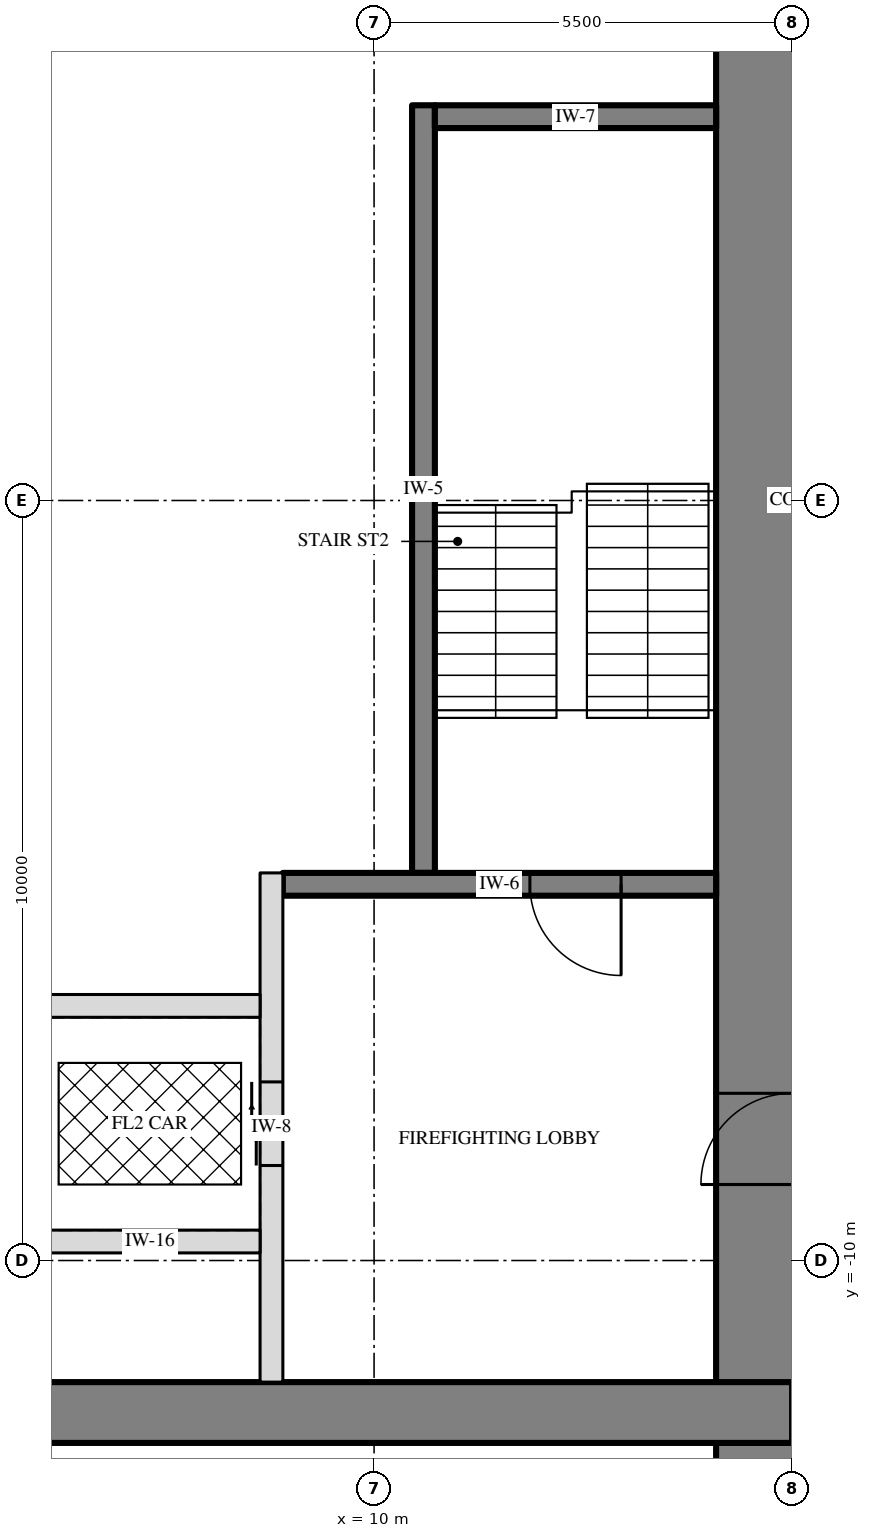
"""IFC4 building model, lengths in metres.
Left out: names, types, materials, properties, quantities, classifications, styles, units other than length and angle.
Written with IfcOpenShell. Run it as: python <this file> out.ifc"""

import sys

from ifc_helpers import new_model, si_unit, direction, frame, frame_2d, origin, place, context, subcontext, project, spatial, rectangle, extrude, element, fill, save


model = new_model("IFC4")
c1 = context("Model", 3, precision=1e-05, world=origin(), true_north=direction((0.0, 1.0)))
c2 = subcontext(c1, "Body", "Model", "MODEL_VIEW")
j1 = project(units=[si_unit("LENGTHUNIT", "METRE"), si_unit("PLANEANGLEUNIT", "RADIAN")], contexts=[c1])
p1 = place(None, origin())
s1 = spatial("IfcSite", under=j1, at=p1, CompositionType="ELEMENT")
p2 = place(p1, origin())
s2 = spatial("IfcBuilding", under=s1, at=p2, CompositionType="ELEMENT")
p3 = place(p2, frame((0.0, 0.0, 107.25)))
s3 = spatial("IfcBuildingStorey", under=s2, at=p3, CompositionType="ELEMENT", Elevation=107.25)
p4 = place(p3, frame((15.5, -15.5, -0.25), z_axis=(0.0, 0.0, 1.0), x_axis=(0.0, 1.0, 0.0)))
e1 = element("IfcWall", 1, at=p4, inside=s3, PredefinedType="SHEAR", context=c2, shape_type="SweptSolid", body=[
    extrude(rectangle(XDim=31.0, YDim=2.0, at=frame_2d((15.5, 0.0))), origin(), (0.0, 0.0, 1.0), 3.75),
])
p5 = place(p4, frame((6.5, 0.0, 0.25)))
e2 = element("IfcOpeningElement", 2, at=p5, cuts=e1, PredefinedType="OPENING", context=c2, shape_type="SweptSolid", body=[
    extrude(rectangle(XDim=1.2, YDim=2.1, at=frame_2d((0.6, 1.05))), frame((0.0, 1.01, 0.0), z_axis=(0.0, -1.0, 0.0), x_axis=(1.0, 0.0, 0.0)), (0.0, 0.0, 1.0), 2.02),
])
p6 = place(p4, frame((23.0, 0.0, 0.25)))
e3 = element("IfcOpeningElement", 3, at=p6, cuts=e1, PredefinedType="OPENING", context=c2, shape_type="SweptSolid", body=[
    extrude(rectangle(XDim=1.8, YDim=2.1, at=frame_2d((0.9, 1.05))), frame((0.0, 1.01, 0.0), z_axis=(0.0, -1.0, 0.0), x_axis=(1.0, 0.0, 0.0)), (0.0, 0.0, 1.0), 2.02),
])
p7 = place(p3, frame((-15.5, -12.0, -0.25), z_axis=(0.0, 0.0, 1.0), x_axis=(1.0, 0.0, 0.0)))
e4 = element("IfcWall", 4, at=p7, inside=s3, PredefinedType="SHEAR", context=c2, shape_type="SweptSolid", body=[
    extrude(rectangle(XDim=31.0, YDim=0.8, at=frame_2d((15.5, 0.0))), origin(), (0.0, 0.0, 1.0), 3.75),
])
p8 = place(p3, frame((10.65, -4.9, 0.0), z_axis=(0.0, 0.0, 1.0), x_axis=(0.0, 1.0, 0.0)))
e5 = element("IfcWall", 5, at=p8, inside=s3, PredefinedType="SOLIDWALL", context=c2, shape_type="SweptSolid", body=[
    extrude(rectangle(XDim=10.1, YDim=0.3, at=frame_2d((5.05, 0.0))), origin(), (0.0, 0.0, 1.0), 3.5),
])
p9 = place(p3, frame((14.5, -5.05, 0.0), z_axis=(0.0, 0.0, 1.0), x_axis=(-1.0, 0.0, 0.0)))
e6 = element("IfcWall", 6, at=p9, inside=s3, PredefinedType="SOLIDWALL", context=c2, shape_type="SweptSolid", body=[
    extrude(rectangle(XDim=5.7, YDim=0.3, at=frame_2d((2.85, 0.0))), origin(), (0.0, 0.0, 1.0), 3.5),
])
p10 = place(p9, frame((1.25, 0.0, 0.0)))
e7 = element("IfcOpeningElement", 7, at=p10, cuts=e6, PredefinedType="OPENING", context=c2, shape_type="SweptSolid", body=[
    extrude(rectangle(XDim=1.2, YDim=2.1, at=frame_2d((0.6, 1.05))), frame((0.0, 0.16, 0.0), z_axis=(0.0, -1.0, 0.0), x_axis=(1.0, 0.0, 0.0)), (0.0, 0.0, 1.0), 0.32),
])
p11 = place(p3, frame((14.5, 5.05, 0.0), z_axis=(0.0, 0.0, 1.0), x_axis=(-1.0, 0.0, 0.0)))
e8 = element("IfcWall", 8, at=p11, inside=s3, PredefinedType="SOLIDWALL", context=c2, shape_type="SweptSolid", body=[
    extrude(rectangle(XDim=3.7, YDim=0.3, at=frame_2d((1.85, 0.0))), origin(), (0.0, 0.0, 1.0), 3.5),
])
p12 = place(p3, frame((8.65, -11.6, 0.0), z_axis=(0.0, 0.0, 1.0), x_axis=(0.0, 1.0, 0.0)))
e9 = element("IfcWall", 9, at=p12, inside=s3, PredefinedType="PARTITIONING", context=c2, shape_type="SweptSolid", body=[
    extrude(rectangle(XDim=6.7, YDim=0.3, at=frame_2d((3.35, 0.0))), origin(), (0.0, 0.0, 1.0), 3.5),
])
p13 = place(p12, frame((2.85, 0.0, 0.0)))
e10 = element("IfcOpeningElement", 10, at=p13, cuts=e9, PredefinedType="OPENING", context=c2, shape_type="SweptSolid", body=[
    extrude(rectangle(XDim=1.1, YDim=2.1, at=frame_2d((0.55, 1.05))), frame((0.0, 0.16, 0.0), z_axis=(0.0, -1.0, 0.0), x_axis=(1.0, 0.0, 0.0)), (0.0, 0.0, 1.0), 0.32),
])
p14 = place(p3, frame((-8.5, -6.65, 0.0), z_axis=(0.0, 0.0, 1.0), x_axis=(1.0, 0.0, 0.0)))
e11 = element("IfcWall", 11, at=p14, inside=s3, PredefinedType="PARTITIONING", context=c2, shape_type="SweptSolid", body=[
    extrude(rectangle(XDim=17.0, YDim=0.3, at=frame_2d((8.5, 0.0))), origin(), (0.0, 0.0, 1.0), 3.5),
])
p15 = place(p14, frame((7.8, 0.0, 0.0)))
e12 = element("IfcOpeningElement", 12, at=p15, cuts=e11, PredefinedType="OPENING", context=c2, shape_type="SweptSolid", body=[
    extrude(rectangle(XDim=1.3, YDim=2.4, at=frame_2d((0.65, 1.2))), frame((0.0, 0.16, 0.0), z_axis=(0.0, -1.0, 0.0), x_axis=(1.0, 0.0, 0.0)), (0.0, 0.0, 1.0), 0.32),
])
p16 = place(p14, frame((5.65, 0.0, 0.0)))
e13 = element("IfcOpeningElement", 13, at=p16, cuts=e11, PredefinedType="OPENING", context=c2, shape_type="SweptSolid", body=[
    extrude(rectangle(XDim=0.9, YDim=2.1, at=frame_2d((0.45, 1.05))), frame((0.0, 0.16, 0.0), z_axis=(0.0, -1.0, 0.0), x_axis=(1.0, 0.0, 0.0)), (0.0, 0.0, 1.0), 0.32),
])
p17 = place(p14, frame((10.4, 0.0, 0.0)))
e14 = element("IfcOpeningElement", 14, at=p17, cuts=e11, PredefinedType="OPENING", context=c2, shape_type="SweptSolid", body=[
    extrude(rectangle(XDim=0.9, YDim=2.1, at=frame_2d((0.45, 1.05))), frame((0.0, 0.16, 0.0), z_axis=(0.0, -1.0, 0.0), x_axis=(1.0, 0.0, 0.0)), (0.0, 0.0, 1.0), 0.32),
])
p18 = place(p3, frame((5.6, -9.75, 0.0), z_axis=(0.0, 0.0, 1.0), x_axis=(1.0, 0.0, 0.0)))
e15 = element("IfcWall", 15, at=p18, inside=s3, PredefinedType="PARTITIONING", context=c2, shape_type="SweptSolid", body=[
    extrude(rectangle(XDim=2.9, YDim=0.3, at=frame_2d((1.45, 0.0))), origin(), (0.0, 0.0, 1.0), 3.5),
])
p19 = place(p3, frame((-10.65, 2.8, 0.0), z_axis=(0.0, 0.0, 1.0), x_axis=(1.0, 0.0, 0.0)))
e16 = element("IfcWall", 16, at=p19, inside=s3, PredefinedType="PARTITIONING", context=c2, shape_type="SweptSolid", body=[
    extrude(rectangle(XDim=21.3, YDim=0.3, at=frame_2d((10.65, 0.0))), origin(), (0.0, 0.0, 1.0), 3.5),
])
p20 = place(p19, frame((10.05, 0.0, 0.0)))
e17 = element("IfcOpeningElement", 17, at=p20, cuts=e16, PredefinedType="OPENING", context=c2, shape_type="SweptSolid", body=[
    extrude(rectangle(XDim=1.2, YDim=2.1, at=frame_2d((0.6, 1.05))), frame((0.0, 0.16, 0.0), z_axis=(0.0, -1.0, 0.0), x_axis=(1.0, 0.0, 0.0)), (0.0, 0.0, 1.0), 0.32),
])
p21 = place(p19, frame((1.493, 0.0, 0.0)))
e18 = element("IfcOpeningElement", 18, at=p21, cuts=e16, PredefinedType="OPENING", context=c2, shape_type="SweptSolid", body=[
    extrude(rectangle(XDim=0.9, YDim=2.1, at=frame_2d((0.45, 1.05))), frame((0.0, 0.16, 0.0), z_axis=(0.0, -1.0, 0.0), x_axis=(1.0, 0.0, 0.0)), (0.0, 0.0, 1.0), 0.32),
])
p22 = place(p19, frame((18.836, 0.0, 0.0)))
e19 = element("IfcOpeningElement", 19, at=p22, cuts=e16, PredefinedType="OPENING", context=c2, shape_type="SweptSolid", body=[
    extrude(rectangle(XDim=0.9, YDim=2.1, at=frame_2d((0.45, 1.05))), frame((0.0, 0.16, 0.0), z_axis=(0.0, -1.0, 0.0), x_axis=(1.0, 0.0, 0.0)), (0.0, 0.0, 1.0), 0.32),
])
p23 = place(p3, frame((6.622, -6.65, 0.0), z_axis=(0.0, 0.0, 1.0), x_axis=(0.0, 1.0, 0.0)))
e20 = element("IfcWall", 20, at=p23, inside=s3, PredefinedType="PARTITIONING", context=c2, shape_type="SweptSolid", body=[
    extrude(rectangle(XDim=9.45, YDim=0.3, at=frame_2d((4.725, 0.0))), origin(), (0.0, 0.0, 1.0), 3.5),
])
p24 = place(p10, origin())
e21 = element("IfcDoor", 21, at=p24, inside=s3, OperationType="SINGLE_SWING_LEFT", PredefinedType="DOOR", context=c2, shape_type="SweptSolid", body=[
    extrude(rectangle(XDim=1.2, YDim=2.1, at=frame_2d((0.6, 1.05))), frame((0.0, 0.025, 0.0), z_axis=(0.0, -1.0, 0.0), x_axis=(1.0, 0.0, 0.0)), (0.0, 0.0, 1.0), 0.05),
])
fill(e7, e21)
p25 = place(p5, origin())
e22 = element("IfcDoor", 22, at=p25, inside=s3, OperationType="SINGLE_SWING_LEFT", PredefinedType="DOOR", context=c2, shape_type="SweptSolid", body=[
    extrude(rectangle(XDim=1.2, YDim=2.1, at=frame_2d((0.6, 1.05))), frame((0.0, 0.025, 0.0), z_axis=(0.0, -1.0, 0.0), x_axis=(1.0, 0.0, 0.0)), (0.0, 0.0, 1.0), 0.05),
])
fill(e2, e22)
p26 = place(p13, origin())
e23 = element("IfcDoor", 23, at=p26, inside=s3, OperationType="DOUBLE_DOOR_SLIDING", PredefinedType="DOOR", context=c2, shape_type="SweptSolid", body=[
    extrude(rectangle(XDim=1.1, YDim=2.1, at=frame_2d((0.55, 1.05))), frame((0.0, 0.025, 0.0), z_axis=(0.0, -1.0, 0.0), x_axis=(1.0, 0.0, 0.0)), (0.0, 0.0, 1.0), 0.05),
])
fill(e10, e23)
p27 = place(p22, origin())
e24 = element("IfcDoor", 24, at=p27, inside=s3, OperationType="SINGLE_SWING_RIGHT", PredefinedType="DOOR", context=c2, shape_type="SweptSolid", body=[
    extrude(rectangle(XDim=0.9, YDim=2.1, at=frame_2d((0.45, 1.05))), frame((0.0, 0.025, 0.0), z_axis=(0.0, -1.0, 0.0), x_axis=(1.0, 0.0, 0.0)), (0.0, 0.0, 1.0), 0.05),
])
fill(e19, e24)
save(model, sys.argv[1])
